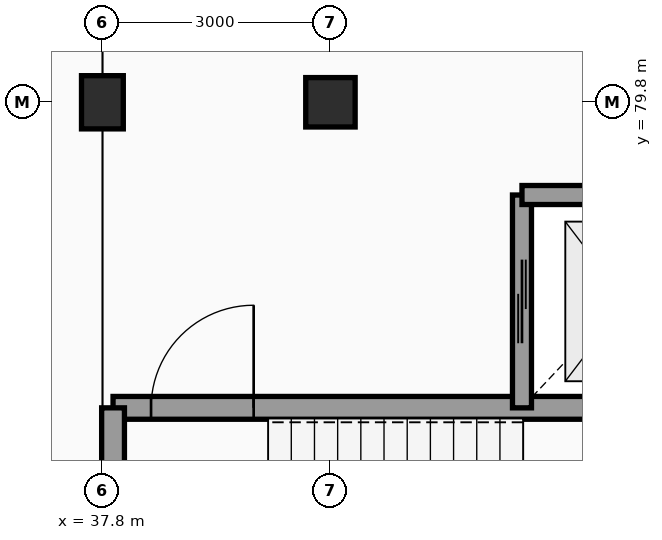
"""IFC4 building model, lengths in metres.
Left out: names, types, materials, properties, quantities, classifications, styles, units other than length and angle.
Written with IfcOpenShell. Run it as: python <this file> out.ifc"""

import sys

from ifc_helpers import new_model, si_unit, direction, frame, frame_2d, origin, origin_2d, place, context, subcontext, project, spatial, rectangle, extrude, element, fill, save


model = new_model("IFC4")
c1 = context("Model", 3, precision=1e-05, world=origin(), true_north=direction((0.0, 1.0)))
c2 = subcontext(c1, "Body", "Model", "MODEL_VIEW")
j1 = project(units=[si_unit("LENGTHUNIT", "METRE"), si_unit("PLANEANGLEUNIT", "RADIAN")], contexts=[c1])
p1 = place(None, origin())
s1 = spatial("IfcSite", under=j1, at=p1, CompositionType="ELEMENT")
p2 = place(p1, origin())
s2 = spatial("IfcBuilding", under=s1, at=p2, CompositionType="ELEMENT")
p3 = place(p2, frame((0.0, 0.0, 4.2)))
s3 = spatial("IfcBuildingStorey", under=s2, at=p3, CompositionType="ELEMENT", Elevation=4.2)
p4 = place(p3, frame((37.8, 79.8, 0.0), z_axis=(0.0, 0.0, 1.0), x_axis=(1.0, 0.0, 0.0)))
e1 = element("IfcColumn", 1, at=p4, inside=s3, PredefinedType="COLUMN", context=c2, shape_type="SweptSolid", body=[
    extrude(rectangle(XDim=0.55, YDim=0.7, at=origin_2d()), origin(), (0.0, 0.0, 1.0), 3.6),
])
p5 = place(p3, frame((40.8, 79.8, 0.0), z_axis=(0.0, 0.0, 1.0), x_axis=(1.0, 0.0, 0.0)))
e2 = element("IfcColumn", 2, at=p5, inside=s3, PredefinedType="COLUMN", context=c2, shape_type="SweptSolid", body=[
    extrude(rectangle(XDim=0.65, YDim=0.65, at=origin_2d()), origin(), (0.0, 0.0, 1.0), 3.6),
])
p6 = place(p3, frame((46.06, 75.78, 0.0), z_axis=(0.0, 0.0, 1.0), x_axis=(-1.0, 0.0, 0.0)))
e3 = element("IfcWall", 3, at=p6, inside=s3, PredefinedType="SHEAR", context=c2, shape_type="SweptSolid", body=[
    extrude(rectangle(XDim=8.12, YDim=0.3, at=frame_2d((4.06, 0.0))), origin(), (0.0, 0.0, 1.0), 3.6),
])
p7 = place(p6, frame((6.27, 0.0, 0.0)))
e4 = element("IfcOpeningElement", 4, at=p7, cuts=e3, PredefinedType="OPENING", context=c2, shape_type="SweptSolid", body=[
    extrude(rectangle(XDim=1.35, YDim=2.15, at=frame_2d((0.675, 1.075))), frame((0.0, 0.16, 0.0), z_axis=(0.0, -1.0, 0.0), x_axis=(1.0, 0.0, 0.0)), (0.0, 0.0, 1.0), 0.32),
])
p8 = place(p3, frame((37.94, 75.78, 0.0), z_axis=(0.0, 0.0, 1.0), x_axis=(0.0, -1.0, 0.0)))
e5 = element("IfcWall", 5, at=p8, inside=s3, PredefinedType="SHEAR", context=c2, shape_type="SweptSolid", body=[
    extrude(rectangle(XDim=4.24, YDim=0.3, at=frame_2d((2.12, 0.0))), origin(), (0.0, 0.0, 1.0), 3.6),
])
p9 = place(p3, frame((43.32, 78.58, 0.0), z_axis=(0.0, 0.0, 1.0), x_axis=(0.0, -1.0, 0.0)))
e6 = element("IfcWall", 6, at=p9, inside=s3, PredefinedType="SHEAR", context=c2, shape_type="SweptSolid", body=[
    extrude(rectangle(XDim=2.8, YDim=0.25, at=frame_2d((1.4, 0.0))), origin(), (0.0, 0.0, 1.0), 3.6),
])
p10 = place(p9, frame((0.85, 0.0, 0.0)))
e7 = element("IfcOpeningElement", 7, at=p10, cuts=e6, PredefinedType="OPENING", context=c2, shape_type="SweptSolid", body=[
    extrude(rectangle(XDim=1.1, YDim=2.15, at=frame_2d((0.55, 1.075))), frame((0.0, 0.135, 0.0), z_axis=(0.0, -1.0, 0.0), x_axis=(1.0, 0.0, 0.0)), (0.0, 0.0, 1.0), 0.27),
])
p11 = place(p3, frame((46.06, 78.58, 0.0), z_axis=(0.0, 0.0, 1.0), x_axis=(-1.0, 0.0, 0.0)))
e8 = element("IfcWall", 8, at=p11, inside=s3, PredefinedType="SHEAR", context=c2, shape_type="SweptSolid", body=[
    extrude(rectangle(XDim=2.74, YDim=0.25, at=frame_2d((1.37, 0.0))), origin(), (0.0, 0.0, 1.0), 3.6),
])
p12 = place(p7, frame((1.35, 0.0, 0.0), z_axis=(0.0, 0.0, 1.0), x_axis=(-1.0, 0.0, 0.0)))
e9 = element("IfcDoor", 9, at=p12, inside=s3, OperationType="SINGLE_SWING_LEFT", PredefinedType="DOOR", context=c2, shape_type="SweptSolid", body=[
    extrude(rectangle(XDim=1.35, YDim=2.15, at=frame_2d((0.675, 1.075))), frame((0.0, 0.025, 0.0), z_axis=(0.0, -1.0, 0.0), x_axis=(1.0, 0.0, 0.0)), (0.0, 0.0, 1.0), 0.05),
])
fill(e4, e9)
p13 = place(p10, origin())
e10 = element("IfcDoor", 10, at=p13, inside=s3, OperationType="DOUBLE_DOOR_SLIDING", PredefinedType="DOOR", context=c2, shape_type="SweptSolid", body=[
    extrude(rectangle(XDim=1.1, YDim=2.15, at=frame_2d((0.55, 1.075))), frame((0.0, 0.025, 0.0), z_axis=(0.0, -1.0, 0.0), x_axis=(1.0, 0.0, 0.0)), (0.0, 0.0, 1.0), 0.05),
])
fill(e7, e10)
save(model, sys.argv[1])
